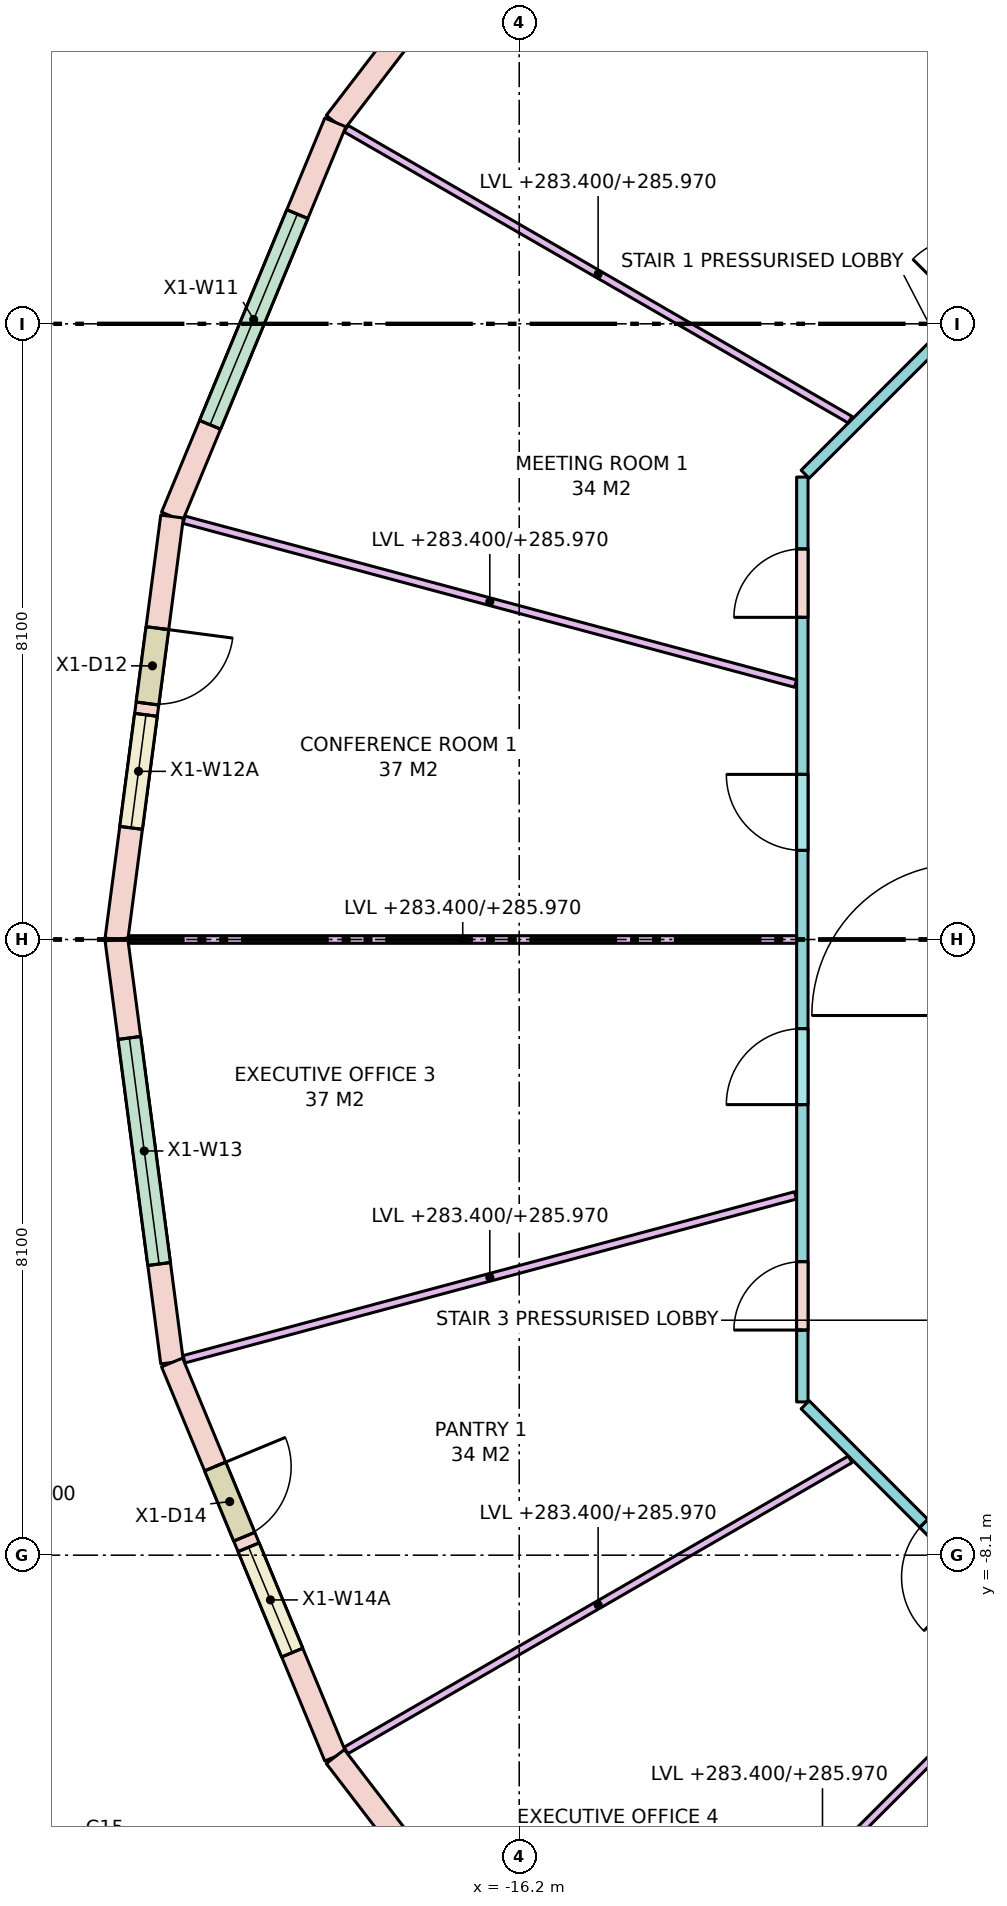
"""IFC4 building model, lengths in metres.
Left out: names, types, materials, properties, quantities, classifications, styles, units other than length and angle.
Written with IfcOpenShell. Run it as: python <this file> out.ifc"""

import sys

from ifc_helpers import new_model, si_unit, direction, frame, frame_2d, origin, place, context, subcontext, project, spatial, rectangle, extrude, element, fill, save


model = new_model("IFC4")
c1 = context("Model", 3, precision=1e-05, world=origin(), true_north=direction((0.0, 1.0)))
c2 = subcontext(c1, "Body", "Model", "MODEL_VIEW")
j1 = project(units=[si_unit("LENGTHUNIT", "METRE"), si_unit("PLANEANGLEUNIT", "RADIAN")], contexts=[c1])
p1 = place(None, origin())
s1 = spatial("IfcSite", under=j1, at=p1, CompositionType="ELEMENT")
p2 = place(p1, origin())
s2 = spatial("IfcBuilding", under=s1, at=p2, CompositionType="ELEMENT")
p3 = place(p2, frame((0.0, 0.0, 283.4)))
s3 = spatial("IfcBuildingStorey", under=s2, at=p3, CompositionType="ELEMENT", Elevation=283.4)
p4 = place(p3, frame((-15.203, 15.203, 0.0), z_axis=(0.0, 0.0, 1.0), x_axis=(-0.608726467567, -0.793380165925, 0.0)))
e1 = element("IfcWall", 1, at=p4, inside=s3, PredefinedType="STANDARD", context=c2, shape_type="SweptSolid", body=[
    extrude(rectangle(XDim=5.613, YDim=0.3, at=frame_2d((2.806, 0.0))), origin(), (0.0, 0.0, 1.0), 3.42),
])
p5 = place(p4, frame((1.481, 0.0, 0.0)))
e2 = element("IfcOpeningElement", 2, at=p5, cuts=e1, PredefinedType="OPENING", context=c2, shape_type="SweptSolid", body=[
    extrude(rectangle(XDim=1.0, YDim=2.4, at=frame_2d((0.5, 1.2))), frame((0.0, 0.16, 0.0), z_axis=(0.0, -1.0, 0.0), x_axis=(1.0, 0.0, 0.0)), (0.0, 0.0, 1.0), 0.32),
])
p6 = place(p4, frame((2.631, 0.0, 0.8)))
e3 = element("IfcOpeningElement", 3, at=p6, cuts=e1, PredefinedType="OPENING", context=c2, shape_type="SweptSolid", body=[
    extrude(rectangle(XDim=1.5, YDim=2.4, at=frame_2d((0.75, 1.2))), frame((0.0, 0.16, 0.0), z_axis=(0.0, -1.0, 0.0), x_axis=(1.0, 0.0, 0.0)), (0.0, 0.0, 1.0), 0.32),
])
p7 = place(p3, frame((-18.619, 10.75, 0.0), z_axis=(0.0, 0.0, 1.0), x_axis=(-0.382702670405, -0.92387156362, 0.0)))
e4 = element("IfcWall", 4, at=p7, inside=s3, PredefinedType="STANDARD", context=c2, shape_type="SweptSolid", body=[
    extrude(rectangle(XDim=5.613, YDim=0.3, at=frame_2d((2.806, 0.0))), origin(), (0.0, 0.0, 1.0), 3.42),
])
p8 = place(p7, frame((1.306, 0.0, 0.8)))
e5 = element("IfcOpeningElement", 5, at=p8, cuts=e4, PredefinedType="OPENING", context=c2, shape_type="SweptSolid", body=[
    extrude(rectangle(XDim=3.0, YDim=2.4, at=frame_2d((1.5, 1.2))), frame((0.0, 0.16, 0.0), z_axis=(0.0, -1.0, 0.0), x_axis=(1.0, 0.0, 0.0)), (0.0, 0.0, 1.0), 0.32),
])
p9 = place(p3, frame((-20.767, 5.565, 0.0), z_axis=(0.0, 0.0, 1.0), x_axis=(-0.130536651449, -0.991443484334, 0.0)))
e6 = element("IfcWall", 6, at=p9, inside=s3, PredefinedType="STANDARD", context=c2, shape_type="SweptSolid", body=[
    extrude(rectangle(XDim=5.613, YDim=0.3, at=frame_2d((2.806, 0.0))), origin(), (0.0, 0.0, 1.0), 3.42),
])
p10 = place(p9, frame((1.481, 0.0, 0.0)))
e7 = element("IfcOpeningElement", 7, at=p10, cuts=e6, PredefinedType="OPENING", context=c2, shape_type="SweptSolid", body=[
    extrude(rectangle(XDim=1.0, YDim=2.4, at=frame_2d((0.5, 1.2))), frame((0.0, 0.16, 0.0), z_axis=(0.0, -1.0, 0.0), x_axis=(1.0, 0.0, 0.0)), (0.0, 0.0, 1.0), 0.32),
])
p11 = place(p9, frame((2.631, 0.0, 0.8)))
e8 = element("IfcOpeningElement", 8, at=p11, cuts=e6, PredefinedType="OPENING", context=c2, shape_type="SweptSolid", body=[
    extrude(rectangle(XDim=1.5, YDim=2.4, at=frame_2d((0.75, 1.2))), frame((0.0, 0.16, 0.0), z_axis=(0.0, -1.0, 0.0), x_axis=(1.0, 0.0, 0.0)), (0.0, 0.0, 1.0), 0.32),
])
p12 = place(p3, frame((-21.5, 0.0, 0.0), z_axis=(0.0, 0.0, 1.0), x_axis=(0.130536651449, -0.991443484334, 0.0)))
e9 = element("IfcWall", 9, at=p12, inside=s3, PredefinedType="STANDARD", context=c2, shape_type="SweptSolid", body=[
    extrude(rectangle(XDim=5.613, YDim=0.3, at=frame_2d((2.806, 0.0))), origin(), (0.0, 0.0, 1.0), 3.42),
])
p13 = place(p12, frame((1.306, 0.0, 0.8)))
e10 = element("IfcOpeningElement", 10, at=p13, cuts=e9, PredefinedType="OPENING", context=c2, shape_type="SweptSolid", body=[
    extrude(rectangle(XDim=3.0, YDim=2.4, at=frame_2d((1.5, 1.2))), frame((0.0, 0.16, 0.0), z_axis=(0.0, -1.0, 0.0), x_axis=(1.0, 0.0, 0.0)), (0.0, 0.0, 1.0), 0.32),
])
p14 = place(p3, frame((-20.767, -5.565, 0.0), z_axis=(0.0, 0.0, 1.0), x_axis=(0.382702670405, -0.92387156362, 0.0)))
e11 = element("IfcWall", 11, at=p14, inside=s3, PredefinedType="STANDARD", context=c2, shape_type="SweptSolid", body=[
    extrude(rectangle(XDim=5.613, YDim=0.3, at=frame_2d((2.806, 0.0))), origin(), (0.0, 0.0, 1.0), 3.42),
])
p15 = place(p14, frame((1.481, 0.0, 0.0)))
e12 = element("IfcOpeningElement", 12, at=p15, cuts=e11, PredefinedType="OPENING", context=c2, shape_type="SweptSolid", body=[
    extrude(rectangle(XDim=1.0, YDim=2.4, at=frame_2d((0.5, 1.2))), frame((0.0, 0.16, 0.0), z_axis=(0.0, -1.0, 0.0), x_axis=(1.0, 0.0, 0.0)), (0.0, 0.0, 1.0), 0.32),
])
p16 = place(p14, frame((2.631, 0.0, 0.8)))
e13 = element("IfcOpeningElement", 13, at=p16, cuts=e11, PredefinedType="OPENING", context=c2, shape_type="SweptSolid", body=[
    extrude(rectangle(XDim=1.5, YDim=2.4, at=frame_2d((0.75, 1.2))), frame((0.0, 0.16, 0.0), z_axis=(0.0, -1.0, 0.0), x_axis=(1.0, 0.0, 0.0)), (0.0, 0.0, 1.0), 0.32),
])
p17 = place(p3, frame((-18.619, -10.75, 0.0), z_axis=(0.0, 0.0, 1.0), x_axis=(0.608726467567, -0.793380165925, 0.0)))
e14 = element("IfcWall", 14, at=p17, inside=s3, PredefinedType="STANDARD", context=c2, shape_type="SweptSolid", body=[
    extrude(rectangle(XDim=5.613, YDim=0.3, at=frame_2d((2.806, 0.0))), origin(), (0.0, 0.0, 1.0), 3.42),
])
p18 = place(p17, frame((1.306, 0.0, 0.8)))
e15 = element("IfcOpeningElement", 15, at=p18, cuts=e14, PredefinedType="OPENING", context=c2, shape_type="SweptSolid", body=[
    extrude(rectangle(XDim=3.0, YDim=2.4, at=frame_2d((1.5, 1.2))), frame((0.0, 0.16, 0.0), z_axis=(0.0, -1.0, 0.0), x_axis=(1.0, 0.0, 0.0)), (0.0, 0.0, 1.0), 0.32),
])
p19 = place(p3, frame((-8.121, -10.438, 0.0), z_axis=(0.0, 0.0, 1.0), x_axis=(-0.707106781187, 0.707106781187, 0.0)))
e16 = element("IfcWall", 16, at=p19, inside=s3, PredefinedType="PARTITIONING", context=c2, shape_type="SweptSolid", body=[
    extrude(rectangle(XDim=6.105, YDim=0.15, at=frame_2d((3.053, 0.0))), origin(), (0.0, 0.0, 1.0), 2.57),
])
p20 = place(p19, frame((2.897, 0.0, 0.0)))
e17 = element("IfcOpeningElement", 17, at=p20, cuts=e16, PredefinedType="OPENING", context=c2, shape_type="SweptSolid", body=[
    extrude(rectangle(XDim=1.0, YDim=2.1, at=frame_2d((0.5, 1.05))), frame((0.0, 0.085, 0.0), z_axis=(0.0, -1.0, 0.0), x_axis=(1.0, 0.0, 0.0)), (0.0, 0.0, 1.0), 0.17),
])
p21 = place(p19, frame((0.394, 0.0, 0.0)))
e18 = element("IfcOpeningElement", 18, at=p21, cuts=e16, PredefinedType="OPENING", context=c2, shape_type="SweptSolid", body=[
    extrude(rectangle(XDim=0.9, YDim=2.1, at=frame_2d((0.45, 1.05))), frame((0.0, 0.085, 0.0), z_axis=(0.0, -1.0, 0.0), x_axis=(1.0, 0.0, 0.0)), (0.0, 0.0, 1.0), 0.17),
])
p22 = place(p3, frame((-12.475, -6.084, 0.0), z_axis=(0.0, 0.0, 1.0), x_axis=(0.0, 1.0, 0.0)))
e19 = element("IfcWall", 19, at=p22, inside=s3, PredefinedType="PARTITIONING", context=c2, shape_type="SweptSolid", body=[
    extrude(rectangle(XDim=12.167, YDim=0.15, at=frame_2d((6.084, 0.0))), origin(), (0.0, 0.0, 1.0), 2.57),
])
p23 = place(p22, frame((10.322, 0.0, 0.0)))
e20 = element("IfcOpeningElement", 20, at=p23, cuts=e19, PredefinedType="OPENING", context=c2, shape_type="SweptSolid", body=[
    extrude(rectangle(XDim=0.9, YDim=2.1, at=frame_2d((0.45, 1.05))), frame((0.0, 0.085, 0.0), z_axis=(0.0, -1.0, 0.0), x_axis=(1.0, 0.0, 0.0)), (0.0, 0.0, 1.0), 0.17),
])
p24 = place(p22, frame((7.256, 0.0, 0.0)))
e21 = element("IfcOpeningElement", 21, at=p24, cuts=e19, PredefinedType="OPENING", context=c2, shape_type="SweptSolid", body=[
    extrude(rectangle(XDim=1.0, YDim=2.1, at=frame_2d((0.5, 1.05))), frame((0.0, 0.085, 0.0), z_axis=(0.0, -1.0, 0.0), x_axis=(1.0, 0.0, 0.0)), (0.0, 0.0, 1.0), 0.17),
])
p25 = place(p22, frame((3.912, 0.0, 0.0)))
e22 = element("IfcOpeningElement", 22, at=p25, cuts=e19, PredefinedType="OPENING", context=c2, shape_type="SweptSolid", body=[
    extrude(rectangle(XDim=1.0, YDim=2.1, at=frame_2d((0.5, 1.05))), frame((0.0, 0.085, 0.0), z_axis=(0.0, -1.0, 0.0), x_axis=(1.0, 0.0, 0.0)), (0.0, 0.0, 1.0), 0.17),
])
p26 = place(p22, frame((0.946, 0.0, 0.0)))
e23 = element("IfcOpeningElement", 23, at=p26, cuts=e19, PredefinedType="OPENING", context=c2, shape_type="SweptSolid", body=[
    extrude(rectangle(XDim=0.9, YDim=2.1, at=frame_2d((0.45, 1.05))), frame((0.0, 0.085, 0.0), z_axis=(0.0, -1.0, 0.0), x_axis=(1.0, 0.0, 0.0)), (0.0, 0.0, 1.0), 0.17),
])
p27 = place(p3, frame((-12.438, 6.121, 0.0), z_axis=(0.0, 0.0, 1.0), x_axis=(0.707106781187, 0.707106781187, 0.0)))
e24 = element("IfcWall", 24, at=p27, inside=s3, PredefinedType="PARTITIONING", context=c2, shape_type="SweptSolid", body=[
    extrude(rectangle(XDim=6.105, YDim=0.15, at=frame_2d((3.053, 0.0))), origin(), (0.0, 0.0, 1.0), 2.57),
])
p28 = place(p27, frame((3.002, 0.0, 0.0)))
e25 = element("IfcOpeningElement", 25, at=p28, cuts=e24, PredefinedType="OPENING", context=c2, shape_type="SweptSolid", body=[
    extrude(rectangle(XDim=1.0, YDim=2.1, at=frame_2d((0.5, 1.05))), frame((0.0, 0.085, 0.0), z_axis=(0.0, -1.0, 0.0), x_axis=(1.0, 0.0, 0.0)), (0.0, 0.0, 1.0), 0.17),
])
p29 = place(p3, frame((-11.846, 6.839, 0.0), z_axis=(0.0, 0.0, 1.0), x_axis=(-0.866007734672, 0.500030602552, 0.0)))
e26 = element("IfcWall", 26, at=p29, inside=s3, PredefinedType="PARTITIONING", context=c2, shape_type="SweptSolid", body=[
    extrude(rectangle(XDim=7.658, YDim=0.1, at=frame_2d((3.829, 0.0))), origin(), (0.0, 0.0, 1.0), 2.57),
])
p30 = place(p3, frame((-12.564, 3.367, 0.0), z_axis=(0.0, 0.0, 1.0), x_axis=(-0.965933136847, 0.258791760188, 0.0)))
e27 = element("IfcWall", 27, at=p30, inside=s3, PredefinedType="PARTITIONING", context=c2, shape_type="SweptSolid", body=[
    extrude(rectangle(XDim=8.329, YDim=0.1, at=frame_2d((4.165, 0.0))), origin(), (0.0, 0.0, 1.0), 2.57),
])
p31 = place(p3, frame((-12.55, 0.0, 0.0), z_axis=(0.0, 0.0, 1.0), x_axis=(-1.0, 0.0, 0.0)))
e28 = element("IfcWall", 28, at=p31, inside=s3, PredefinedType="PARTITIONING", context=c2, shape_type="SweptSolid", body=[
    extrude(rectangle(XDim=8.787, YDim=0.1, at=frame_2d((4.393, 0.0))), origin(), (0.0, 0.0, 1.0), 2.57),
])
p32 = place(p3, frame((-12.564, -3.367, 0.0), z_axis=(0.0, 0.0, 1.0), x_axis=(-0.965933136847, -0.258791760188, 0.0)))
e29 = element("IfcWall", 29, at=p32, inside=s3, PredefinedType="PARTITIONING", context=c2, shape_type="SweptSolid", body=[
    extrude(rectangle(XDim=8.329, YDim=0.1, at=frame_2d((4.165, 0.0))), origin(), (0.0, 0.0, 1.0), 2.57),
])
p33 = place(p3, frame((-11.846, -6.839, 0.0), z_axis=(0.0, 0.0, 1.0), x_axis=(-0.866007734672, -0.500030602552, 0.0)))
e30 = element("IfcWall", 30, at=p33, inside=s3, PredefinedType="PARTITIONING", context=c2, shape_type="SweptSolid", body=[
    extrude(rectangle(XDim=7.658, YDim=0.1, at=frame_2d((3.829, 0.0))), origin(), (0.0, 0.0, 1.0), 2.57),
])
p34 = place(p3, frame((-9.333, -9.333, 0.0), z_axis=(0.0, 0.0, 1.0), x_axis=(-0.707106781187, -0.707106781187, 0.0)))
e31 = element("IfcWall", 31, at=p34, inside=s3, PredefinedType="PARTITIONING", context=c2, shape_type="SweptSolid", body=[
    extrude(rectangle(XDim=8.139, YDim=0.1, at=frame_2d((4.069, 0.0))), origin(), (0.0, 0.0, 1.0), 2.57),
])
p35 = place(p8, origin())
e32 = element("IfcWindow", 32, at=p35, inside=s3, PartitioningType="SINGLE_PANEL", PredefinedType="WINDOW", context=c2, shape_type="SweptSolid", body=[
    extrude(rectangle(XDim=3.0, YDim=2.4, at=frame_2d((1.5, 1.2))), frame((0.0, 0.03, 0.0), z_axis=(0.0, -1.0, 0.0), x_axis=(1.0, 0.0, 0.0)), (0.0, 0.0, 1.0), 0.06),
])
fill(e5, e32)
p36 = place(p10, origin())
e33 = element("IfcDoor", 33, at=p36, inside=s3, OperationType="SINGLE_SWING_LEFT", PredefinedType="DOOR", context=c2, shape_type="SweptSolid", body=[
    extrude(rectangle(XDim=1.0, YDim=2.4, at=frame_2d((0.5, 1.2))), frame((0.0, 0.025, 0.0), z_axis=(0.0, -1.0, 0.0), x_axis=(1.0, 0.0, 0.0)), (0.0, 0.0, 1.0), 0.05),
])
fill(e7, e33)
p37 = place(p11, origin())
e34 = element("IfcWindow", 34, at=p37, inside=s3, PartitioningType="SINGLE_PANEL", PredefinedType="WINDOW", context=c2, shape_type="SweptSolid", body=[
    extrude(rectangle(XDim=1.5, YDim=2.4, at=frame_2d((0.75, 1.2))), frame((0.0, 0.03, 0.0), z_axis=(0.0, -1.0, 0.0), x_axis=(1.0, 0.0, 0.0)), (0.0, 0.0, 1.0), 0.06),
])
fill(e8, e34)
p38 = place(p13, origin())
e35 = element("IfcWindow", 35, at=p38, inside=s3, PartitioningType="SINGLE_PANEL", PredefinedType="WINDOW", context=c2, shape_type="SweptSolid", body=[
    extrude(rectangle(XDim=3.0, YDim=2.4, at=frame_2d((1.5, 1.2))), frame((0.0, 0.03, 0.0), z_axis=(0.0, -1.0, 0.0), x_axis=(1.0, 0.0, 0.0)), (0.0, 0.0, 1.0), 0.06),
])
fill(e10, e35)
p39 = place(p15, origin())
e36 = element("IfcDoor", 36, at=p39, inside=s3, OperationType="SINGLE_SWING_LEFT", PredefinedType="DOOR", context=c2, shape_type="SweptSolid", body=[
    extrude(rectangle(XDim=1.0, YDim=2.4, at=frame_2d((0.5, 1.2))), frame((0.0, 0.025, 0.0), z_axis=(0.0, -1.0, 0.0), x_axis=(1.0, 0.0, 0.0)), (0.0, 0.0, 1.0), 0.05),
])
fill(e12, e36)
p40 = place(p16, origin())
e37 = element("IfcWindow", 37, at=p40, inside=s3, PartitioningType="SINGLE_PANEL", PredefinedType="WINDOW", context=c2, shape_type="SweptSolid", body=[
    extrude(rectangle(XDim=1.5, YDim=2.4, at=frame_2d((0.75, 1.2))), frame((0.0, 0.03, 0.0), z_axis=(0.0, -1.0, 0.0), x_axis=(1.0, 0.0, 0.0)), (0.0, 0.0, 1.0), 0.06),
])
fill(e13, e37)
p41 = place(p23, origin())
e38 = element("IfcDoor", 38, at=p41, inside=s3, OperationType="SINGLE_SWING_LEFT", PredefinedType="DOOR", context=c2, shape_type="SweptSolid", body=[
    extrude(rectangle(XDim=0.9, YDim=2.1, at=frame_2d((0.45, 1.05))), frame((0.0, 0.025, 0.0), z_axis=(0.0, -1.0, 0.0), x_axis=(1.0, 0.0, 0.0)), (0.0, 0.0, 1.0), 0.05),
])
fill(e20, e38)
p42 = place(p24, origin())
e39 = element("IfcDoor", 39, at=p42, inside=s3, OperationType="SINGLE_SWING_RIGHT", PredefinedType="DOOR", context=c2, shape_type="SweptSolid", body=[
    extrude(rectangle(XDim=1.0, YDim=2.1, at=frame_2d((0.5, 1.05))), frame((0.0, 0.025, 0.0), z_axis=(0.0, -1.0, 0.0), x_axis=(1.0, 0.0, 0.0)), (0.0, 0.0, 1.0), 0.05),
])
fill(e21, e39)
p43 = place(p25, origin())
e40 = element("IfcDoor", 40, at=p43, inside=s3, OperationType="SINGLE_SWING_LEFT", PredefinedType="DOOR", context=c2, shape_type="SweptSolid", body=[
    extrude(rectangle(XDim=1.0, YDim=2.1, at=frame_2d((0.5, 1.05))), frame((0.0, 0.025, 0.0), z_axis=(0.0, -1.0, 0.0), x_axis=(1.0, 0.0, 0.0)), (0.0, 0.0, 1.0), 0.05),
])
fill(e22, e40)
p44 = place(p26, origin())
e41 = element("IfcDoor", 41, at=p44, inside=s3, OperationType="SINGLE_SWING_LEFT", PredefinedType="DOOR", context=c2, shape_type="SweptSolid", body=[
    extrude(rectangle(XDim=0.9, YDim=2.1, at=frame_2d((0.45, 1.05))), frame((0.0, 0.025, 0.0), z_axis=(0.0, -1.0, 0.0), x_axis=(1.0, 0.0, 0.0)), (0.0, 0.0, 1.0), 0.05),
])
fill(e23, e41)
p45 = place(p20, origin())
e42 = element("IfcDoor", 42, at=p45, inside=s3, OperationType="SINGLE_SWING_LEFT", PredefinedType="DOOR", context=c2, shape_type="SweptSolid", body=[
    extrude(rectangle(XDim=1.0, YDim=2.1, at=frame_2d((0.5, 1.05))), frame((0.0, 0.025, 0.0), z_axis=(0.0, -1.0, 0.0), x_axis=(1.0, 0.0, 0.0)), (0.0, 0.0, 1.0), 0.05),
])
fill(e17, e42)
save(model, sys.argv[1])
